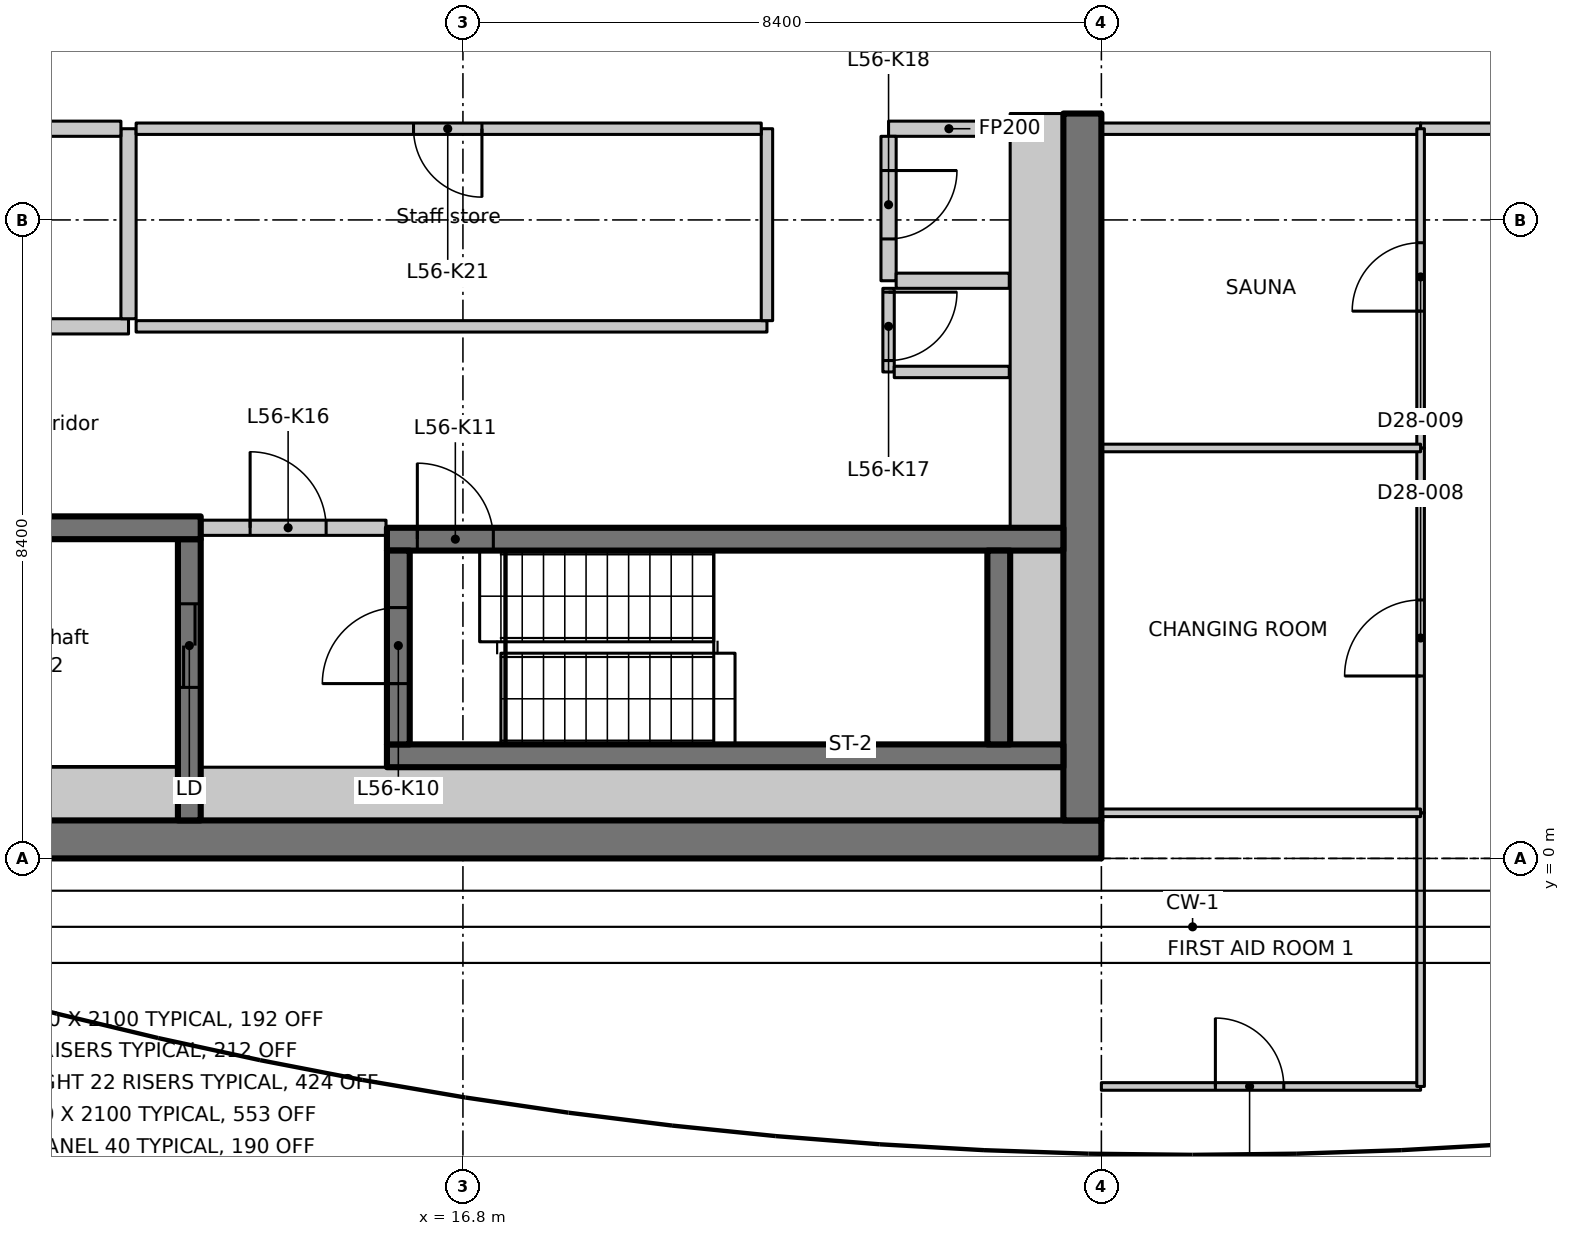
"""IFC4 building model, lengths in metres.
Left out: names, types, materials, properties, quantities, classifications, styles, units other than length and angle.
Written with IfcOpenShell. Run it as: python <this file> out.ifc"""

import sys

from ifc_helpers import new_model, si_unit, direction, frame, frame_2d, origin, place, context, subcontext, project, spatial, rectangle, extrude, element, fill, save


model = new_model("IFC4")
c1 = context("Model", 3, precision=1e-05, world=origin(), true_north=direction((0.0, 1.0)))
c2 = subcontext(c1, "Body", "Model", "MODEL_VIEW")
j1 = project(units=[si_unit("LENGTHUNIT", "METRE"), si_unit("PLANEANGLEUNIT", "RADIAN")], contexts=[c1])
p1 = place(None, origin())
s1 = spatial("IfcSite", under=j1, at=p1, CompositionType="ELEMENT")
p2 = place(p1, origin())
s2 = spatial("IfcBuilding", under=s1, at=p2, CompositionType="ELEMENT")
p3 = place(p2, frame((0.0, 0.0, 222.9)))
s3 = spatial("IfcBuildingStorey", under=s2, at=p3, CompositionType="ELEMENT", Elevation=222.9)
p4 = place(p3, frame((7.436, 0.25, 0.0), z_axis=(0.0, 0.0, 1.0), x_axis=(1.0, 0.0, 0.0)))
e1 = element("IfcWall", 1, at=p4, inside=s3, PredefinedType="SHEAR", context=c2, shape_type="SweptSolid", body=[
    extrude(rectangle(XDim=17.764, YDim=0.5, at=frame_2d((8.882, 0.0))), origin(), (0.0, 0.0, 1.0), 3.35),
])
p5 = place(p3, frame((24.95, 0.5, 0.0), z_axis=(0.0, 0.0, 1.0), x_axis=(0.0, 1.0, 0.0)))
e2 = element("IfcWall", 2, at=p5, inside=s3, PredefinedType="SHEAR", context=c2, shape_type="SweptSolid", body=[
    extrude(rectangle(XDim=9.3, YDim=0.5, at=frame_2d((4.65, 0.0))), origin(), (0.0, 0.0, 1.0), 3.35),
])
p6 = place(p3, frame((13.2, 0.5, 0.0), z_axis=(0.0, 0.0, 1.0), x_axis=(0.0, 1.0, 0.0)))
e3 = element("IfcWall", 3, at=p6, inside=s3, PredefinedType="SHEAR", context=c2, shape_type="SweptSolid", body=[
    extrude(rectangle(XDim=3.7, YDim=0.3, at=frame_2d((1.85, 0.0))), origin(), (0.0, 0.0, 1.0), 3.35),
])
p7 = place(p6, frame((1.75, 0.0, 0.0)))
e4 = element("IfcOpeningElement", 4, at=p7, cuts=e3, PredefinedType="OPENING", context=c2, shape_type="SweptSolid", body=[
    extrude(rectangle(XDim=1.1, YDim=2.3, at=frame_2d((0.55, 1.15))), frame((0.0, 0.16, 0.0), z_axis=(0.0, -1.0, 0.0), x_axis=(1.0, 0.0, 0.0)), (0.0, 0.0, 1.0), 0.32),
])
p8 = place(p3, frame((10.05, 4.35, 0.0), z_axis=(0.0, 0.0, 1.0), x_axis=(1.0, 0.0, 0.0)))
e5 = element("IfcWall", 5, at=p8, inside=s3, PredefinedType="SHEAR", context=c2, shape_type="SweptSolid", body=[
    extrude(rectangle(XDim=3.3, YDim=0.3, at=frame_2d((1.65, 0.0))), origin(), (0.0, 0.0, 1.0), 3.35),
])
p9 = place(p3, frame((15.8, 1.35, 0.0), z_axis=(0.0, 0.0, 1.0), x_axis=(1.0, 0.0, 0.0)))
e6 = element("IfcWall", 6, at=p9, inside=s3, PredefinedType="SHEAR", context=c2, shape_type="SweptSolid", body=[
    extrude(rectangle(XDim=8.9, YDim=0.3, at=frame_2d((4.45, 0.0))), origin(), (0.0, 0.0, 1.0), 3.35),
])
p10 = place(p3, frame((15.8, 4.2, 0.0), z_axis=(0.0, 0.0, 1.0), x_axis=(1.0, 0.0, 0.0)))
e7 = element("IfcWall", 7, at=p10, inside=s3, PredefinedType="SHEAR", context=c2, shape_type="SweptSolid", body=[
    extrude(rectangle(XDim=8.9, YDim=0.3, at=frame_2d((4.45, 0.0))), origin(), (0.0, 0.0, 1.0), 3.35),
])
p11 = place(p10, frame((0.4, 0.0, 0.0)))
e8 = element("IfcOpeningElement", 8, at=p11, cuts=e7, PredefinedType="OPENING", context=c2, shape_type="SweptSolid", body=[
    extrude(rectangle(XDim=1.0, YDim=2.1, at=frame_2d((0.5, 1.05))), frame((0.0, 0.16, 0.0), z_axis=(0.0, -1.0, 0.0), x_axis=(1.0, 0.0, 0.0)), (0.0, 0.0, 1.0), 0.32),
])
p12 = place(p3, frame((15.95, 1.5, 0.0), z_axis=(0.0, 0.0, 1.0), x_axis=(0.0, 1.0, 0.0)))
e9 = element("IfcWall", 9, at=p12, inside=s3, PredefinedType="SHEAR", context=c2, shape_type="SweptSolid", body=[
    extrude(rectangle(XDim=2.55, YDim=0.3, at=frame_2d((1.275, 0.0))), origin(), (0.0, 0.0, 1.0), 3.35),
])
p13 = place(p12, frame((0.8, 0.0, 0.0)))
e10 = element("IfcOpeningElement", 10, at=p13, cuts=e9, PredefinedType="OPENING", context=c2, shape_type="SweptSolid", body=[
    extrude(rectangle(XDim=1.0, YDim=2.1, at=frame_2d((0.5, 1.05))), frame((0.0, 0.16, 0.0), z_axis=(0.0, -1.0, 0.0), x_axis=(1.0, 0.0, 0.0)), (0.0, 0.0, 1.0), 0.32),
])
p14 = place(p3, frame((23.85, 1.5, 0.0), z_axis=(0.0, 0.0, 1.0), x_axis=(0.0, 1.0, 0.0)))
e11 = element("IfcWall", 11, at=p14, inside=s3, PredefinedType="SHEAR", context=c2, shape_type="SweptSolid", body=[
    extrude(rectangle(XDim=2.55, YDim=0.3, at=frame_2d((1.275, 0.0))), origin(), (0.0, 0.0, 1.0), 3.35),
])
p15 = place(p3, frame((13.362, 4.35, 0.0), z_axis=(0.0, 0.0, 1.0), x_axis=(1.0, 0.0, 0.0)))
e12 = element("IfcWall", 12, at=p15, inside=s3, PredefinedType="PARTITIONING", context=c2, shape_type="SweptSolid", body=[
    extrude(rectangle(XDim=2.426, YDim=0.2, at=frame_2d((1.213, 0.0))), origin(), (0.0, 0.0, 1.0), 3.35),
])
p16 = place(p15, frame((0.638, 0.0, 0.0)))
e13 = element("IfcOpeningElement", 13, at=p16, cuts=e12, PredefinedType="OPENING", context=c2, shape_type="SweptSolid", body=[
    extrude(rectangle(XDim=1.0, YDim=2.1, at=frame_2d((0.5, 1.05))), frame((0.0, 0.11, 0.0), z_axis=(0.0, -1.0, 0.0), x_axis=(1.0, 0.0, 0.0)), (0.0, 0.0, 1.0), 0.22),
])
p17 = place(p3, frame((23.988, 9.6, 0.0), z_axis=(0.0, 0.0, 1.0), x_axis=(-1.0, 0.0, 0.0)))
e14 = element("IfcWall", 14, at=p17, inside=s3, PredefinedType="PARTITIONING", context=c2, shape_type="SweptSolid", body=[
    extrude(rectangle(XDim=1.588, YDim=0.2, at=frame_2d((0.794, 0.0))), origin(), (0.0, 0.0, 1.0), 3.35),
])
p18 = place(p3, frame((22.4, 9.5, 0.0), z_axis=(0.0, 0.0, 1.0), x_axis=(0.0, -1.0, 0.0)))
e15 = element("IfcWall", 15, at=p18, inside=s3, PredefinedType="PARTITIONING", context=c2, shape_type="SweptSolid", body=[
    extrude(rectangle(XDim=1.9, YDim=0.2, at=frame_2d((0.95, 0.0))), origin(), (0.0, 0.0, 1.0), 3.35),
])
p19 = place(p18, frame((0.45, 0.0, 0.0)))
e16 = element("IfcOpeningElement", 16, at=p19, cuts=e15, PredefinedType="OPENING", context=c2, shape_type="SweptSolid", body=[
    extrude(rectangle(XDim=0.9, YDim=2.1, at=frame_2d((0.45, 1.05))), frame((0.0, 0.11, 0.0), z_axis=(0.0, -1.0, 0.0), x_axis=(1.0, 0.0, 0.0)), (0.0, 0.0, 1.0), 0.22),
])
p20 = place(p3, frame((22.5, 7.6, 0.0), z_axis=(0.0, 0.0, 1.0), x_axis=(1.0, 0.0, 0.0)))
e17 = element("IfcWall", 17, at=p20, inside=s3, PredefinedType="PARTITIONING", context=c2, shape_type="SweptSolid", body=[
    extrude(rectangle(XDim=1.488, YDim=0.2, at=frame_2d((0.744, 0.0))), origin(), (0.0, 0.0, 1.0), 3.35),
])
p21 = place(p3, frame((6.8, 7.0, 0.0), z_axis=(0.0, 0.0, 1.0), x_axis=(1.0, 0.0, 0.0)))
e18 = element("IfcWall", 18, at=p21, inside=s3, PredefinedType="PARTITIONING", context=c2, shape_type="SweptSolid", body=[
    extrude(rectangle(XDim=5.6, YDim=0.2, at=frame_2d((2.8, 0.0))), origin(), (0.0, 0.0, 1.0), 3.35),
])
p22 = place(p3, frame((12.4, 7.1, 0.0), z_axis=(0.0, 0.0, 1.0), x_axis=(0.0, 1.0, 0.0)))
e19 = element("IfcWall", 19, at=p22, inside=s3, PredefinedType="PARTITIONING", context=c2, shape_type="SweptSolid", body=[
    extrude(rectangle(XDim=2.5, YDim=0.2, at=frame_2d((1.25, 0.0))), origin(), (0.0, 0.0, 1.0), 3.35),
])
p23 = place(p3, frame((12.3, 9.6, 0.0), z_axis=(0.0, 0.0, 1.0), x_axis=(-1.0, 0.0, 0.0)))
e20 = element("IfcWall", 20, at=p23, inside=s3, PredefinedType="PARTITIONING", context=c2, shape_type="SweptSolid", body=[
    extrude(rectangle(XDim=5.5, YDim=0.2, at=frame_2d((2.75, 0.0))), origin(), (0.0, 0.0, 1.0), 3.35),
])
p24 = place(p23, frame((2.25, 0.0, 0.0)))
e21 = element("IfcOpeningElement", 21, at=p24, cuts=e20, PredefinedType="OPENING", context=c2, shape_type="SweptSolid", body=[
    extrude(rectangle(XDim=0.9, YDim=2.1, at=frame_2d((0.45, 1.05))), frame((0.0, 0.11, 0.0), z_axis=(0.0, -1.0, 0.0), x_axis=(1.0, 0.0, 0.0)), (0.0, 0.0, 1.0), 0.22),
])
p25 = place(p3, frame((12.5, 7.0, 0.0), z_axis=(0.0, 0.0, 1.0), x_axis=(1.0, 0.0, 0.0)))
e22 = element("IfcWall", 22, at=p25, inside=s3, PredefinedType="PARTITIONING", context=c2, shape_type="SweptSolid", body=[
    extrude(rectangle(XDim=8.3, YDim=0.15, at=frame_2d((4.15, 0.0))), origin(), (0.0, 0.0, 1.0), 3.35),
])
p26 = place(p3, frame((20.8, 7.075, 0.0), z_axis=(0.0, 0.0, 1.0), x_axis=(0.0, 1.0, 0.0)))
e23 = element("IfcWall", 23, at=p26, inside=s3, PredefinedType="PARTITIONING", context=c2, shape_type="SweptSolid", body=[
    extrude(rectangle(XDim=2.525, YDim=0.15, at=frame_2d((1.263, 0.0))), origin(), (0.0, 0.0, 1.0), 3.35),
])
p27 = place(p3, frame((20.725, 9.6, 0.0), z_axis=(0.0, 0.0, 1.0), x_axis=(-1.0, 0.0, 0.0)))
e24 = element("IfcWall", 24, at=p27, inside=s3, PredefinedType="PARTITIONING", context=c2, shape_type="SweptSolid", body=[
    extrude(rectangle(XDim=8.225, YDim=0.15, at=frame_2d((4.113, 0.0))), origin(), (0.0, 0.0, 1.0), 3.35),
])
p28 = place(p27, frame((3.675, 0.0, 0.0)))
e25 = element("IfcOpeningElement", 25, at=p28, cuts=e24, PredefinedType="OPENING", context=c2, shape_type="SweptSolid", body=[
    extrude(rectangle(XDim=0.9, YDim=2.1, at=frame_2d((0.45, 1.05))), frame((0.0, 0.085, 0.0), z_axis=(0.0, -1.0, 0.0), x_axis=(1.0, 0.0, 0.0)), (0.0, 0.0, 1.0), 0.17),
])
p29 = place(p3, frame((22.4, 7.5, 0.0), z_axis=(0.0, 0.0, 1.0), x_axis=(0.0, -1.0, 0.0)))
e26 = element("IfcWall", 26, at=p29, inside=s3, PredefinedType="PARTITIONING", context=c2, shape_type="SweptSolid", body=[
    extrude(rectangle(XDim=1.1, YDim=0.15, at=frame_2d((0.55, 0.0))), origin(), (0.0, 0.0, 1.0), 3.35),
])
p30 = place(p29, frame((0.05, 0.0, 0.0)))
e27 = element("IfcOpeningElement", 27, at=p30, cuts=e26, PredefinedType="OPENING", context=c2, shape_type="SweptSolid", body=[
    extrude(rectangle(XDim=0.9, YDim=2.1, at=frame_2d((0.45, 1.05))), frame((0.0, 0.085, 0.0), z_axis=(0.0, -1.0, 0.0), x_axis=(1.0, 0.0, 0.0)), (0.0, 0.0, 1.0), 0.17),
])
p31 = place(p3, frame((22.475, 6.4, 0.0), z_axis=(0.0, 0.0, 1.0), x_axis=(1.0, 0.0, 0.0)))
e28 = element("IfcWall", 28, at=p31, inside=s3, PredefinedType="PARTITIONING", context=c2, shape_type="SweptSolid", body=[
    extrude(rectangle(XDim=1.513, YDim=0.15, at=frame_2d((0.756, 0.0))), origin(), (0.0, 0.0, 1.0), 3.35),
])
p32 = place(p3, frame((10.35, 0.85, 0.0), z_axis=(0.0, 0.0, 1.0), x_axis=(1.0, 0.0, 0.0)))
e29 = element("IfcWall", 29, at=p32, inside=s3, PredefinedType="PARTITIONING", context=c2, shape_type="SweptSolid", body=[
    extrude(rectangle(XDim=2.7, YDim=0.7, at=frame_2d((1.35, 0.0))), origin(), (0.0, 0.0, 1.0), 3.35),
])
p33 = place(p3, frame((13.35, 0.85, 0.0), z_axis=(0.0, 0.0, 1.0), x_axis=(1.0, 0.0, 0.0)))
e30 = element("IfcWall", 30, at=p33, inside=s3, PredefinedType="PARTITIONING", context=c2, shape_type="SweptSolid", body=[
    extrude(rectangle(XDim=11.35, YDim=0.7, at=frame_2d((5.675, 0.0))), origin(), (0.0, 0.0, 1.0), 3.35),
])
p34 = place(p3, frame((24.35, 1.5, 0.0), z_axis=(0.0, 0.0, 1.0), x_axis=(0.0, 1.0, 0.0)))
e31 = element("IfcWall", 31, at=p34, inside=s3, PredefinedType="PARTITIONING", context=c2, shape_type="SweptSolid", body=[
    extrude(rectangle(XDim=2.55, YDim=0.7, at=frame_2d((1.275, 0.0))), origin(), (0.0, 0.0, 1.0), 3.35),
])
p35 = place(p3, frame((24.35, 4.35, 0.0), z_axis=(0.0, 0.0, 1.0), x_axis=(0.0, 1.0, 0.0)))
e32 = element("IfcWall", 32, at=p35, inside=s3, PredefinedType="PARTITIONING", context=c2, shape_type="SweptSolid", body=[
    extrude(rectangle(XDim=5.45, YDim=0.7, at=frame_2d((2.725, 0.0))), origin(), (0.0, 0.0, 1.0), 3.35),
])
p36 = place(p3, frame((29.4, 9.6, 0.0), z_axis=(0.0, 0.0, 1.0), x_axis=(-1.0, 0.0, 0.0)))
e33 = element("IfcWall", 33, at=p36, inside=s3, PredefinedType="PARTITIONING", context=c2, shape_type="SweptSolid", body=[
    extrude(rectangle(XDim=4.2, YDim=0.15, at=frame_2d((2.1, 0.0))), origin(), (0.0, 0.0, 1.0), 3.33),
])
p37 = place(p3, frame((37.8, 9.6, 0.0), z_axis=(0.0, 0.0, 1.0), x_axis=(-1.0, 0.0, 0.0)))
e34 = element("IfcWall", 34, at=p37, inside=s3, PredefinedType="PARTITIONING", context=c2, shape_type="SweptSolid", body=[
    extrude(rectangle(XDim=8.4, YDim=0.15, at=frame_2d((4.2, 0.0))), origin(), (0.0, 0.0, 1.0), 3.33),
])
p38 = place(p37, frame((4.8, 0.0, 0.0)))
e35 = element("IfcOpeningElement", 35, at=p38, cuts=e34, PredefinedType="OPENING", context=c2, shape_type="SweptSolid", body=[
    extrude(rectangle(XDim=2.0, YDim=2.4, at=frame_2d((1.0, 1.2))), frame((0.0, 0.085, 0.0), z_axis=(0.0, -1.0, 0.0), x_axis=(1.0, 0.0, 0.0)), (0.0, 0.0, 1.0), 0.17),
])
p39 = place(p3, frame((25.2, -3.0, 0.0), z_axis=(0.0, 0.0, 1.0), x_axis=(1.0, 0.0, 0.0)))
e36 = element("IfcWall", 36, at=p39, inside=s3, PredefinedType="PARTITIONING", context=c2, shape_type="SweptSolid", body=[
    extrude(rectangle(XDim=4.2, YDim=0.1, at=frame_2d((2.1, 0.0))), origin(), (0.0, 0.0, 1.0), 3.33),
])
p40 = place(p39, frame((1.5, 0.0, 0.0)))
e37 = element("IfcOpeningElement", 37, at=p40, cuts=e36, PredefinedType="OPENING", context=c2, shape_type="SweptSolid", body=[
    extrude(rectangle(XDim=0.9, YDim=2.1, at=frame_2d((0.45, 1.05))), frame((0.0, 0.06, 0.0), z_axis=(0.0, -1.0, 0.0), x_axis=(1.0, 0.0, 0.0)), (0.0, 0.0, 1.0), 0.12),
])
p41 = place(p3, frame((29.4, -3.0, 0.0), z_axis=(0.0, 0.0, 1.0), x_axis=(0.0, 1.0, 0.0)))
e38 = element("IfcWall", 38, at=p41, inside=s3, PredefinedType="PARTITIONING", context=c2, shape_type="SweptSolid", body=[
    extrude(rectangle(XDim=3.6, YDim=0.1, at=frame_2d((1.8, 0.0))), origin(), (0.0, 0.0, 1.0), 2.98),
])
p42 = place(p3, frame((29.4, 0.6, 0.0), z_axis=(0.0, 0.0, 1.0), x_axis=(0.0, 1.0, 0.0)))
e39 = element("IfcWall", 39, at=p42, inside=s3, PredefinedType="PARTITIONING", context=c2, shape_type="SweptSolid", body=[
    extrude(rectangle(XDim=4.8, YDim=0.1, at=frame_2d((2.4, 0.0))), origin(), (0.0, 0.0, 1.0), 3.33),
])
p43 = place(p42, frame((1.8, 0.0, 0.0)))
e40 = element("IfcOpeningElement", 40, at=p43, cuts=e39, PredefinedType="OPENING", context=c2, shape_type="SweptSolid", body=[
    extrude(rectangle(XDim=1.0, YDim=2.1, at=frame_2d((0.5, 1.05))), frame((0.0, 0.06, 0.0), z_axis=(0.0, -1.0, 0.0), x_axis=(1.0, 0.0, 0.0)), (0.0, 0.0, 1.0), 0.12),
])
p44 = place(p3, frame((29.4, 5.4, 0.0), z_axis=(0.0, 0.0, 1.0), x_axis=(0.0, 1.0, 0.0)))
e41 = element("IfcWall", 41, at=p44, inside=s3, PredefinedType="PARTITIONING", context=c2, shape_type="SweptSolid", body=[
    extrude(rectangle(XDim=4.2, YDim=0.1, at=frame_2d((2.1, 0.0))), origin(), (0.0, 0.0, 1.0), 3.33),
])
p45 = place(p44, frame((1.8, 0.0, 0.0)))
e42 = element("IfcOpeningElement", 42, at=p45, cuts=e41, PredefinedType="OPENING", context=c2, shape_type="SweptSolid", body=[
    extrude(rectangle(XDim=0.9, YDim=2.1, at=frame_2d((0.45, 1.05))), frame((0.0, 0.06, 0.0), z_axis=(0.0, -1.0, 0.0), x_axis=(1.0, 0.0, 0.0)), (0.0, 0.0, 1.0), 0.12),
])
for number, where, z_axis, x_axis in (
    (43, (25.2, 0.6, 0.0), (0.0, 0.0, 1.0), (1.0, 0.0, 0.0)),
    (44, (25.2, 5.4, 0.0), (0.0, 0.0, 1.0), (1.0, 0.0, 0.0)),
):
    element("IfcWall", number, at=place(p3, frame(where, z_axis=z_axis, x_axis=x_axis)), inside=s3, PredefinedType="PARTITIONING", context=c2, shape_type="SweptSolid", body=[
        extrude(rectangle(XDim=4.2, YDim=0.1, at=frame_2d((2.1, 0.0))), origin(), (0.0, 0.0, 1.0), 3.33),
    ])
p46 = place(p7, origin())
e45 = element("IfcDoor", 45, at=p46, inside=s3, OperationType="SLIDING_TO_LEFT", PredefinedType="DOOR", context=c2, shape_type="SweptSolid", body=[
    extrude(rectangle(XDim=1.1, YDim=2.3, at=frame_2d((0.55, 1.15))), frame((0.0, 0.025, 0.0), z_axis=(0.0, -1.0, 0.0), x_axis=(1.0, 0.0, 0.0)), (0.0, 0.0, 1.0), 0.05),
])
fill(e4, e45)
p47 = place(p13, origin())
e46 = element("IfcDoor", 46, at=p47, inside=s3, OperationType="SINGLE_SWING_LEFT", PredefinedType="DOOR", context=c2, shape_type="SweptSolid", body=[
    extrude(rectangle(XDim=1.0, YDim=2.1, at=frame_2d((0.5, 1.05))), frame((0.0, 0.025, 0.0), z_axis=(0.0, -1.0, 0.0), x_axis=(1.0, 0.0, 0.0)), (0.0, 0.0, 1.0), 0.05),
])
fill(e10, e46)
p48 = place(p11, origin())
e47 = element("IfcDoor", 47, at=p48, inside=s3, OperationType="SINGLE_SWING_RIGHT", PredefinedType="DOOR", context=c2, shape_type="SweptSolid", body=[
    extrude(rectangle(XDim=1.0, YDim=2.1, at=frame_2d((0.5, 1.05))), frame((0.0, 0.025, 0.0), z_axis=(0.0, -1.0, 0.0), x_axis=(1.0, 0.0, 0.0)), (0.0, 0.0, 1.0), 0.05),
])
fill(e8, e47)
p49 = place(p16, origin())
e48 = element("IfcDoor", 48, at=p49, inside=s3, OperationType="SINGLE_SWING_LEFT", PredefinedType="DOOR", context=c2, shape_type="SweptSolid", body=[
    extrude(rectangle(XDim=1.0, YDim=2.1, at=frame_2d((0.5, 1.05))), frame((0.0, 0.025, 0.0), z_axis=(0.0, -1.0, 0.0), x_axis=(1.0, 0.0, 0.0)), (0.0, 0.0, 1.0), 0.05),
])
fill(e13, e48)
p50 = place(p30, origin())
e49 = element("IfcDoor", 49, at=p50, inside=s3, OperationType="SINGLE_SWING_RIGHT", PredefinedType="DOOR", context=c2, shape_type="SweptSolid", body=[
    extrude(rectangle(XDim=0.9, YDim=2.1, at=frame_2d((0.45, 1.05))), frame((0.0, 0.025, 0.0), z_axis=(0.0, -1.0, 0.0), x_axis=(1.0, 0.0, 0.0)), (0.0, 0.0, 1.0), 0.05),
])
fill(e27, e49)
p51 = place(p19, origin())
e50 = element("IfcDoor", 50, at=p51, inside=s3, OperationType="SINGLE_SWING_LEFT", PredefinedType="DOOR", context=c2, shape_type="SweptSolid", body=[
    extrude(rectangle(XDim=0.9, YDim=2.1, at=frame_2d((0.45, 1.05))), frame((0.0, 0.025, 0.0), z_axis=(0.0, -1.0, 0.0), x_axis=(1.0, 0.0, 0.0)), (0.0, 0.0, 1.0), 0.05),
])
fill(e16, e50)
p52 = place(p28, origin())
e51 = element("IfcDoor", 51, at=p52, inside=s3, OperationType="SINGLE_SWING_RIGHT", PredefinedType="DOOR", context=c2, shape_type="SweptSolid", body=[
    extrude(rectangle(XDim=0.9, YDim=2.1, at=frame_2d((0.45, 1.05))), frame((0.0, 0.025, 0.0), z_axis=(0.0, -1.0, 0.0), x_axis=(1.0, 0.0, 0.0)), (0.0, 0.0, 1.0), 0.05),
])
fill(e25, e51)
p53 = place(p40, origin())
e52 = element("IfcDoor", 52, at=p53, inside=s3, OperationType="SINGLE_SWING_LEFT", PredefinedType="DOOR", context=c2, shape_type="SweptSolid", body=[
    extrude(rectangle(XDim=0.9, YDim=2.1, at=frame_2d((0.45, 1.05))), frame((0.0, 0.025, 0.0), z_axis=(0.0, -1.0, 0.0), x_axis=(1.0, 0.0, 0.0)), (0.0, 0.0, 1.0), 0.05),
])
fill(e37, e52)
p54 = place(p43, origin())
e53 = element("IfcDoor", 53, at=p54, inside=s3, OperationType="SINGLE_SWING_LEFT", PredefinedType="DOOR", context=c2, shape_type="SweptSolid", body=[
    extrude(rectangle(XDim=1.0, YDim=2.1, at=frame_2d((0.5, 1.05))), frame((0.0, 0.025, 0.0), z_axis=(0.0, -1.0, 0.0), x_axis=(1.0, 0.0, 0.0)), (0.0, 0.0, 1.0), 0.05),
])
fill(e40, e53)
p55 = place(p45, origin())
e54 = element("IfcDoor", 54, at=p55, inside=s3, OperationType="SINGLE_SWING_LEFT", PredefinedType="DOOR", context=c2, shape_type="SweptSolid", body=[
    extrude(rectangle(XDim=0.9, YDim=2.1, at=frame_2d((0.45, 1.05))), frame((0.0, 0.025, 0.0), z_axis=(0.0, -1.0, 0.0), x_axis=(1.0, 0.0, 0.0)), (0.0, 0.0, 1.0), 0.05),
])
fill(e42, e54)
save(model, sys.argv[1])
